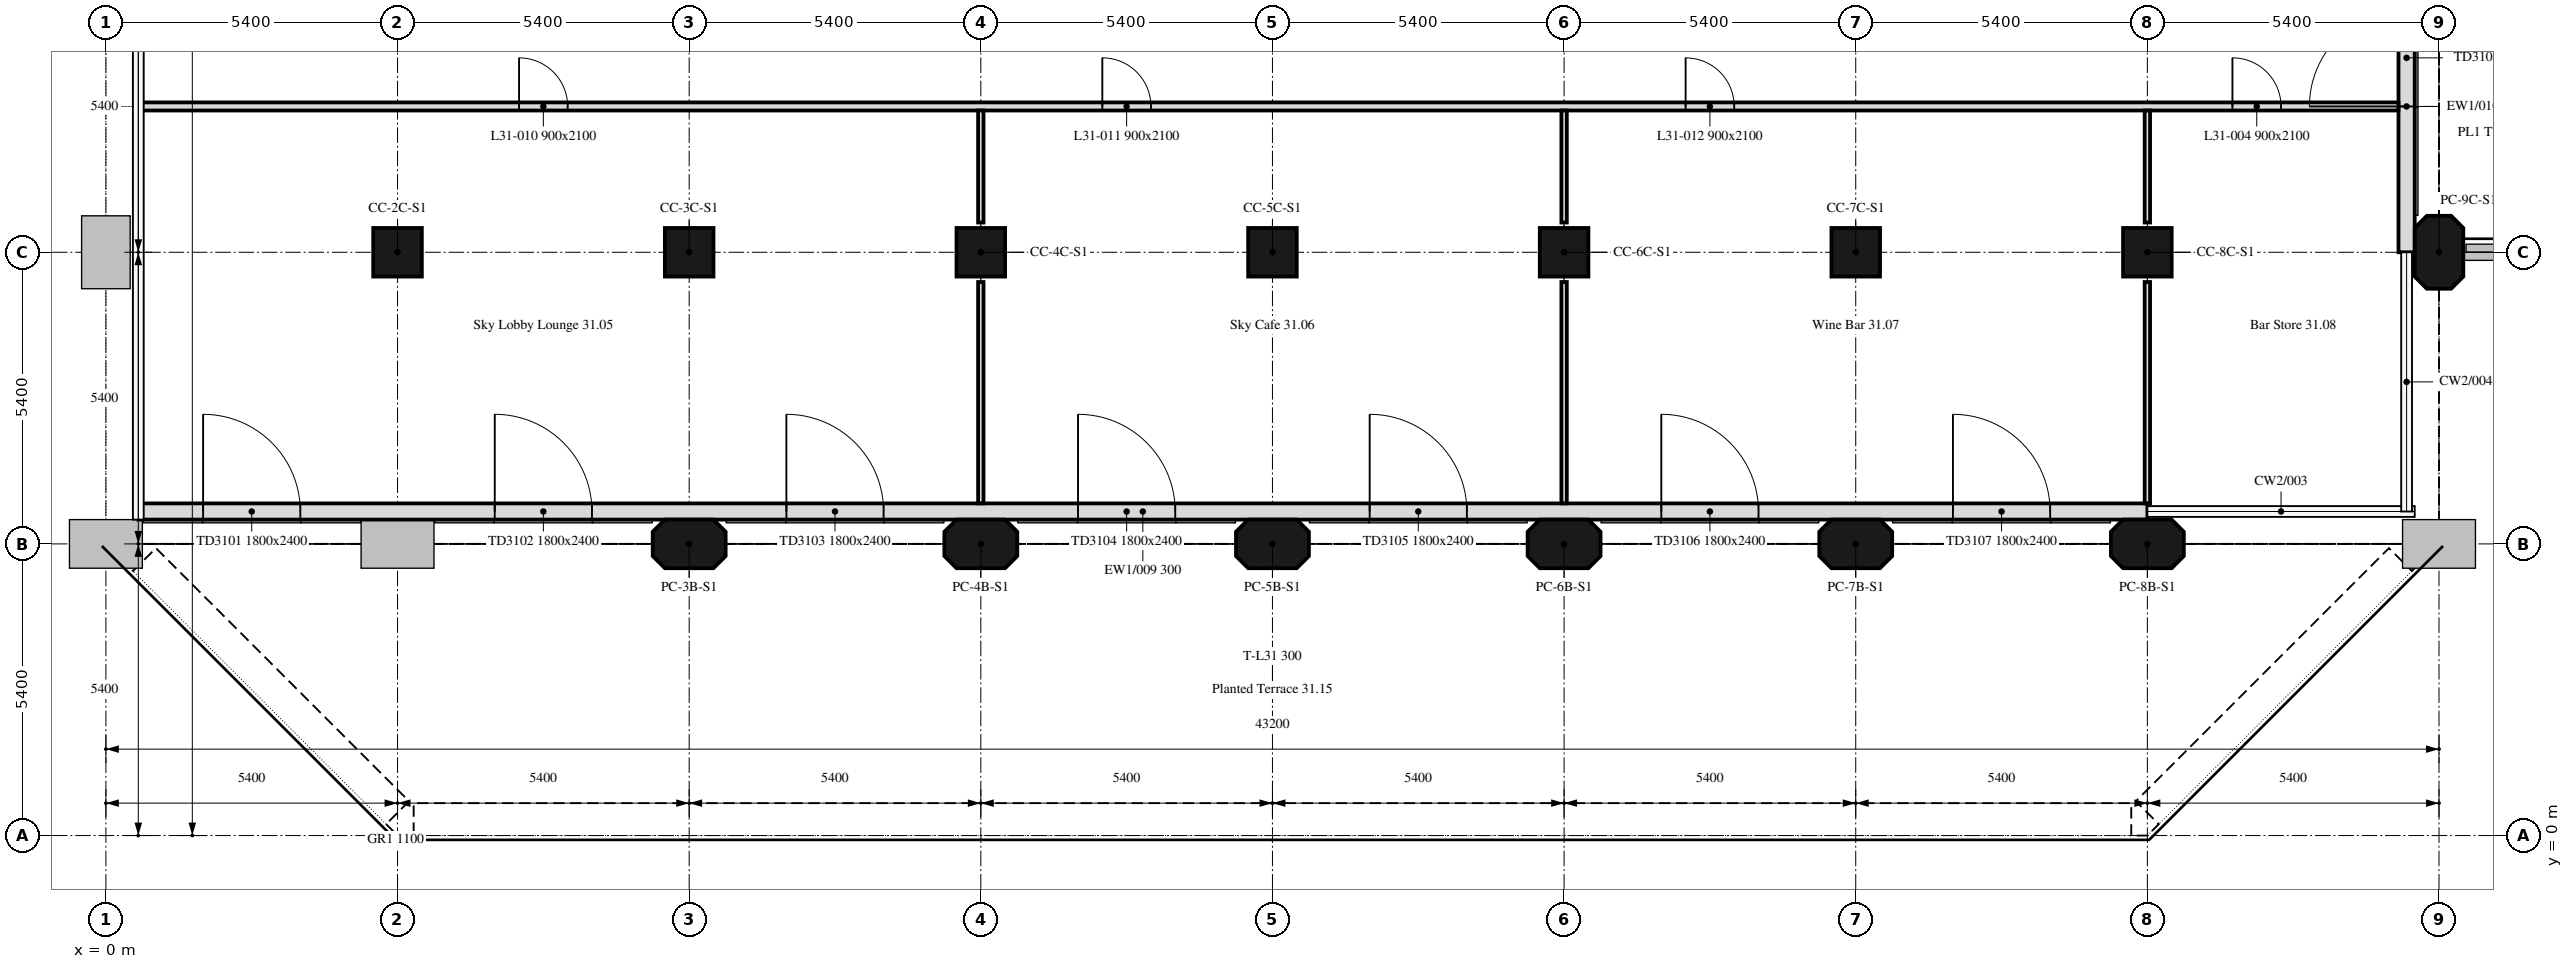
"""IFC4 building model, lengths in metres.
Left out: names, types, materials, properties, quantities, classifications, styles, units other than length and angle.
Written with IfcOpenShell. Run it as: python <this file> out.ifc"""

import sys

from ifc_helpers import new_model, si_unit, direction, frame, frame_2d, origin, origin_2d, place, context, subcontext, project, spatial, polyline, rectangle, outline, extrude, element, fill, save


model = new_model("IFC4")
c1 = context("Model", 3, precision=1e-05, world=origin(), true_north=direction((0.0, 1.0)))
c2 = subcontext(c1, "Body", "Model", "MODEL_VIEW")
j1 = project(units=[si_unit("LENGTHUNIT", "METRE"), si_unit("PLANEANGLEUNIT", "RADIAN")], contexts=[c1])
p1 = place(None, origin())
s1 = spatial("IfcSite", under=j1, at=p1, CompositionType="ELEMENT")
p2 = place(p1, origin())
s2 = spatial("IfcBuilding", under=s1, at=p2, CompositionType="ELEMENT")
p3 = place(p2, frame((0.0, 0.0, 130.6)))
s3 = spatial("IfcBuildingStorey", under=s2, at=p3, CompositionType="ELEMENT", Elevation=130.6)
for number, where, z_axis, x_axis in (
    (1, (10.8, 5.4, 0.0), (0.0, 0.0, 1.0), (1.0, 0.0, 0.0)),
    (2, (16.2, 5.4, 0.0), (0.0, 0.0, 1.0), (1.0, 0.0, 0.0)),
    (3, (21.6, 5.4, 0.0), (0.0, 0.0, 1.0), (1.0, 0.0, 0.0)),
    (4, (27.0, 5.4, 0.0), (0.0, 0.0, 1.0), (1.0, 0.0, 0.0)),
    (5, (32.4, 5.4, 0.0), (0.0, 0.0, 1.0), (1.0, 0.0, 0.0)),
    (6, (37.8, 5.4, 0.0), (0.0, 0.0, 1.0), (1.0, 0.0, 0.0)),
):
    element("IfcColumn", number, at=place(p3, frame(where, z_axis=z_axis, x_axis=x_axis)), inside=s3, PredefinedType="COLUMN", context=c2, shape_type="SweptSolid", body=[
        extrude(outline(polyline([(-0.45, -0.45), (0.45, -0.45), (0.675, -0.225), (0.675, 0.225), (0.45, 0.45), (-0.45, 0.45), (-0.675, 0.225), (-0.675, -0.225), (-0.45, -0.45)])), origin(), (0.0, 0.0, 1.0), 7.5),
    ])
for number, where, z_axis, x_axis in (
    (7, (5.4, 10.8, 0.0), (0.0, 0.0, 1.0), (1.0, 0.0, 0.0)),
    (8, (10.8, 10.8, 0.0), (0.0, 0.0, 1.0), (1.0, 0.0, 0.0)),
    (9, (16.2, 10.8, 0.0), (0.0, 0.0, 1.0), (1.0, 0.0, 0.0)),
    (10, (21.6, 10.8, 0.0), (0.0, 0.0, 1.0), (1.0, 0.0, 0.0)),
    (11, (27.0, 10.8, 0.0), (0.0, 0.0, 1.0), (1.0, 0.0, 0.0)),
    (12, (32.4, 10.8, 0.0), (0.0, 0.0, 1.0), (1.0, 0.0, 0.0)),
    (13, (37.8, 10.8, 0.0), (0.0, 0.0, 1.0), (1.0, 0.0, 0.0)),
):
    element("IfcColumn", number, at=place(p3, frame(where, z_axis=z_axis, x_axis=x_axis)), inside=s3, PredefinedType="COLUMN", context=c2, shape_type="SweptSolid", body=[
        extrude(rectangle(XDim=0.9, YDim=0.9, at=origin_2d()), origin(), (0.0, 0.0, 1.0), 7.5),
    ])
p4 = place(p3, frame((43.2, 10.8, 0.0), z_axis=(0.0, 0.0, 1.0), x_axis=(0.0, 1.0, 0.0)))
e14 = element("IfcColumn", 14, at=p4, inside=s3, PredefinedType="COLUMN", context=c2, shape_type="SweptSolid", body=[
    extrude(outline(polyline([(-0.45, -0.45), (0.45, -0.45), (0.675, -0.225), (0.675, 0.225), (0.45, 0.45), (-0.45, 0.45), (-0.675, 0.225), (-0.675, -0.225), (-0.45, -0.45)])), origin(), (0.0, 0.0, 1.0), 7.5),
])
p5 = place(p3, frame((0.6, 6.0, 0.0), z_axis=(0.0, 0.0, 1.0), x_axis=(1.0, 0.0, 0.0)))
e15 = element("IfcWall", 15, at=p5, inside=s3, PredefinedType="SOLIDWALL", context=c2, shape_type="SweptSolid", body=[
    extrude(rectangle(XDim=37.2, YDim=0.3, at=frame_2d((18.6, 0.0))), origin(), (0.0, 0.0, 1.0), 7.5),
])
p6 = place(p5, frame((1.2, 0.0, 0.0)))
e16 = element("IfcOpeningElement", 16, at=p6, cuts=e15, PredefinedType="OPENING", context=c2, shape_type="SweptSolid", body=[
    extrude(rectangle(XDim=1.8, YDim=2.4, at=frame_2d((0.9, 1.2))), frame((0.0, 0.16, 0.0), z_axis=(0.0, -1.0, 0.0), x_axis=(1.0, 0.0, 0.0)), (0.0, 0.0, 1.0), 0.32),
])
p7 = place(p5, frame((6.6, 0.0, 0.0)))
e17 = element("IfcOpeningElement", 17, at=p7, cuts=e15, PredefinedType="OPENING", context=c2, shape_type="SweptSolid", body=[
    extrude(rectangle(XDim=1.8, YDim=2.4, at=frame_2d((0.9, 1.2))), frame((0.0, 0.16, 0.0), z_axis=(0.0, -1.0, 0.0), x_axis=(1.0, 0.0, 0.0)), (0.0, 0.0, 1.0), 0.32),
])
p8 = place(p5, frame((12.0, 0.0, 0.0)))
e18 = element("IfcOpeningElement", 18, at=p8, cuts=e15, PredefinedType="OPENING", context=c2, shape_type="SweptSolid", body=[
    extrude(rectangle(XDim=1.8, YDim=2.4, at=frame_2d((0.9, 1.2))), frame((0.0, 0.16, 0.0), z_axis=(0.0, -1.0, 0.0), x_axis=(1.0, 0.0, 0.0)), (0.0, 0.0, 1.0), 0.32),
])
p9 = place(p5, frame((17.4, 0.0, 0.0)))
e19 = element("IfcOpeningElement", 19, at=p9, cuts=e15, PredefinedType="OPENING", context=c2, shape_type="SweptSolid", body=[
    extrude(rectangle(XDim=1.8, YDim=2.4, at=frame_2d((0.9, 1.2))), frame((0.0, 0.16, 0.0), z_axis=(0.0, -1.0, 0.0), x_axis=(1.0, 0.0, 0.0)), (0.0, 0.0, 1.0), 0.32),
])
p10 = place(p5, frame((22.8, 0.0, 0.0)))
e20 = element("IfcOpeningElement", 20, at=p10, cuts=e15, PredefinedType="OPENING", context=c2, shape_type="SweptSolid", body=[
    extrude(rectangle(XDim=1.8, YDim=2.4, at=frame_2d((0.9, 1.2))), frame((0.0, 0.16, 0.0), z_axis=(0.0, -1.0, 0.0), x_axis=(1.0, 0.0, 0.0)), (0.0, 0.0, 1.0), 0.32),
])
p11 = place(p5, frame((28.2, 0.0, 0.0)))
e21 = element("IfcOpeningElement", 21, at=p11, cuts=e15, PredefinedType="OPENING", context=c2, shape_type="SweptSolid", body=[
    extrude(rectangle(XDim=1.8, YDim=2.4, at=frame_2d((0.9, 1.2))), frame((0.0, 0.16, 0.0), z_axis=(0.0, -1.0, 0.0), x_axis=(1.0, 0.0, 0.0)), (0.0, 0.0, 1.0), 0.32),
])
p12 = place(p5, frame((33.6, 0.0, 0.0)))
e22 = element("IfcOpeningElement", 22, at=p12, cuts=e15, PredefinedType="OPENING", context=c2, shape_type="SweptSolid", body=[
    extrude(rectangle(XDim=1.8, YDim=2.4, at=frame_2d((0.9, 1.2))), frame((0.0, 0.16, 0.0), z_axis=(0.0, -1.0, 0.0), x_axis=(1.0, 0.0, 0.0)), (0.0, 0.0, 1.0), 0.32),
])
p13 = place(p3, frame((42.6, 10.8, 0.0), z_axis=(0.0, 0.0, 1.0), x_axis=(0.0, 1.0, 0.0)))
e23 = element("IfcWall", 23, at=p13, inside=s3, PredefinedType="SOLIDWALL", context=c2, shape_type="SweptSolid", body=[
    extrude(rectangle(XDim=5.4, YDim=0.3, at=frame_2d((2.7, 0.0))), origin(), (0.0, 0.0, 1.0), 7.5),
])
p14 = place(p13, frame((2.7, 0.0, 0.0)))
e24 = element("IfcOpeningElement", 24, at=p14, cuts=e23, PredefinedType="OPENING", context=c2, shape_type="SweptSolid", body=[
    extrude(rectangle(XDim=1.8, YDim=2.4, at=frame_2d((0.9, 1.2))), frame((0.0, 0.16, 0.0), z_axis=(0.0, -1.0, 0.0), x_axis=(1.0, 0.0, 0.0)), (0.0, 0.0, 1.0), 0.32),
])
p15 = place(p3, frame((0.6, 13.5, 0.0), z_axis=(0.0, 0.0, 1.0), x_axis=(1.0, 0.0, 0.0)))
e25 = element("IfcWall", 25, at=p15, inside=s3, PredefinedType="PARTITIONING", context=c2, shape_type="SweptSolid", body=[
    extrude(rectangle(XDim=41.849, YDim=0.15, at=frame_2d((20.924, 0.0))), origin(), (0.0, 0.0, 1.0), 7.5),
])
p16 = place(p15, frame((38.775, 0.0, 0.0)))
e26 = element("IfcOpeningElement", 26, at=p16, cuts=e25, PredefinedType="OPENING", context=c2, shape_type="SweptSolid", body=[
    extrude(rectangle(XDim=0.9, YDim=2.1, at=frame_2d((0.45, 1.05))), frame((0.0, 0.075, 0.0), z_axis=(0.0, -1.0, 0.0), x_axis=(1.0, 0.0, 0.0)), (0.0, 0.0, 1.0), 0.15),
])
p17 = place(p15, frame((7.05, 0.0, 0.0)))
e27 = element("IfcOpeningElement", 27, at=p17, cuts=e25, PredefinedType="OPENING", context=c2, shape_type="SweptSolid", body=[
    extrude(rectangle(XDim=0.9, YDim=2.1, at=frame_2d((0.45, 1.05))), frame((0.0, 0.075, 0.0), z_axis=(0.0, -1.0, 0.0), x_axis=(1.0, 0.0, 0.0)), (0.0, 0.0, 1.0), 0.15),
])
p18 = place(p15, frame((17.85, 0.0, 0.0)))
e28 = element("IfcOpeningElement", 28, at=p18, cuts=e25, PredefinedType="OPENING", context=c2, shape_type="SweptSolid", body=[
    extrude(rectangle(XDim=0.9, YDim=2.1, at=frame_2d((0.45, 1.05))), frame((0.0, 0.075, 0.0), z_axis=(0.0, -1.0, 0.0), x_axis=(1.0, 0.0, 0.0)), (0.0, 0.0, 1.0), 0.15),
])
p19 = place(p15, frame((28.65, 0.0, 0.0)))
e29 = element("IfcOpeningElement", 29, at=p19, cuts=e25, PredefinedType="OPENING", context=c2, shape_type="SweptSolid", body=[
    extrude(rectangle(XDim=0.9, YDim=2.1, at=frame_2d((0.45, 1.05))), frame((0.0, 0.075, 0.0), z_axis=(0.0, -1.0, 0.0), x_axis=(1.0, 0.0, 0.0)), (0.0, 0.0, 1.0), 0.15),
])
p20 = place(p3, frame((16.2, 6.151, 0.0), z_axis=(0.0, 0.0, 1.0), x_axis=(0.0, 1.0, 0.0)))
e30 = element("IfcWall", 30, at=p20, inside=s3, PredefinedType="PARTITIONING", context=c2, shape_type="SweptSolid", body=[
    extrude(rectangle(XDim=4.098, YDim=0.1, at=frame_2d((2.049, 0.0))), origin(), (0.0, 0.0, 1.0), 7.5),
])
p21 = place(p3, frame((16.2, 11.351, 0.0), z_axis=(0.0, 0.0, 1.0), x_axis=(0.0, 1.0, 0.0)))
e31 = element("IfcWall", 31, at=p21, inside=s3, PredefinedType="PARTITIONING", context=c2, shape_type="SweptSolid", body=[
    extrude(rectangle(XDim=2.074, YDim=0.1, at=frame_2d((1.037, 0.0))), origin(), (0.0, 0.0, 1.0), 7.5),
])
p22 = place(p3, frame((27.0, 6.151, 0.0), z_axis=(0.0, 0.0, 1.0), x_axis=(0.0, 1.0, 0.0)))
e32 = element("IfcWall", 32, at=p22, inside=s3, PredefinedType="PARTITIONING", context=c2, shape_type="SweptSolid", body=[
    extrude(rectangle(XDim=4.098, YDim=0.1, at=frame_2d((2.049, 0.0))), origin(), (0.0, 0.0, 1.0), 7.5),
])
p23 = place(p3, frame((27.0, 11.351, 0.0), z_axis=(0.0, 0.0, 1.0), x_axis=(0.0, 1.0, 0.0)))
e33 = element("IfcWall", 33, at=p23, inside=s3, PredefinedType="PARTITIONING", context=c2, shape_type="SweptSolid", body=[
    extrude(rectangle(XDim=2.074, YDim=0.1, at=frame_2d((1.037, 0.0))), origin(), (0.0, 0.0, 1.0), 7.5),
])
p24 = place(p3, frame((37.8, 6.151, 0.0), z_axis=(0.0, 0.0, 1.0), x_axis=(0.0, 1.0, 0.0)))
e34 = element("IfcWall", 34, at=p24, inside=s3, PredefinedType="PARTITIONING", context=c2, shape_type="SweptSolid", body=[
    extrude(rectangle(XDim=4.098, YDim=0.1, at=frame_2d((2.049, 0.0))), origin(), (0.0, 0.0, 1.0), 7.5),
])
p25 = place(p3, frame((37.8, 11.351, 0.0), z_axis=(0.0, 0.0, 1.0), x_axis=(0.0, 1.0, 0.0)))
e35 = element("IfcWall", 35, at=p25, inside=s3, PredefinedType="PARTITIONING", context=c2, shape_type="SweptSolid", body=[
    extrude(rectangle(XDim=2.074, YDim=0.1, at=frame_2d((1.037, 0.0))), origin(), (0.0, 0.0, 1.0), 7.5),
])
p26 = place(p6, origin())
e36 = element("IfcDoor", 36, at=p26, inside=s3, OperationType="DOUBLE_DOOR_DOUBLE_SWING", PredefinedType="DOOR", context=c2, shape_type="SweptSolid", body=[
    extrude(rectangle(XDim=1.8, YDim=2.4, at=frame_2d((0.9, 1.2))), frame((0.0, 0.025, 0.0), z_axis=(0.0, -1.0, 0.0), x_axis=(1.0, 0.0, 0.0)), (0.0, 0.0, 1.0), 0.05),
])
fill(e16, e36)
p27 = place(p7, origin())
e37 = element("IfcDoor", 37, at=p27, inside=s3, OperationType="DOUBLE_DOOR_DOUBLE_SWING", PredefinedType="DOOR", context=c2, shape_type="SweptSolid", body=[
    extrude(rectangle(XDim=1.8, YDim=2.4, at=frame_2d((0.9, 1.2))), frame((0.0, 0.025, 0.0), z_axis=(0.0, -1.0, 0.0), x_axis=(1.0, 0.0, 0.0)), (0.0, 0.0, 1.0), 0.05),
])
fill(e17, e37)
p28 = place(p8, origin())
e38 = element("IfcDoor", 38, at=p28, inside=s3, OperationType="DOUBLE_DOOR_DOUBLE_SWING", PredefinedType="DOOR", context=c2, shape_type="SweptSolid", body=[
    extrude(rectangle(XDim=1.8, YDim=2.4, at=frame_2d((0.9, 1.2))), frame((0.0, 0.025, 0.0), z_axis=(0.0, -1.0, 0.0), x_axis=(1.0, 0.0, 0.0)), (0.0, 0.0, 1.0), 0.05),
])
fill(e18, e38)
p29 = place(p9, origin())
e39 = element("IfcDoor", 39, at=p29, inside=s3, OperationType="DOUBLE_DOOR_DOUBLE_SWING", PredefinedType="DOOR", context=c2, shape_type="SweptSolid", body=[
    extrude(rectangle(XDim=1.8, YDim=2.4, at=frame_2d((0.9, 1.2))), frame((0.0, 0.025, 0.0), z_axis=(0.0, -1.0, 0.0), x_axis=(1.0, 0.0, 0.0)), (0.0, 0.0, 1.0), 0.05),
])
fill(e19, e39)
p30 = place(p10, origin())
e40 = element("IfcDoor", 40, at=p30, inside=s3, OperationType="DOUBLE_DOOR_DOUBLE_SWING", PredefinedType="DOOR", context=c2, shape_type="SweptSolid", body=[
    extrude(rectangle(XDim=1.8, YDim=2.4, at=frame_2d((0.9, 1.2))), frame((0.0, 0.025, 0.0), z_axis=(0.0, -1.0, 0.0), x_axis=(1.0, 0.0, 0.0)), (0.0, 0.0, 1.0), 0.05),
])
fill(e20, e40)
p31 = place(p11, origin())
e41 = element("IfcDoor", 41, at=p31, inside=s3, OperationType="DOUBLE_DOOR_DOUBLE_SWING", PredefinedType="DOOR", context=c2, shape_type="SweptSolid", body=[
    extrude(rectangle(XDim=1.8, YDim=2.4, at=frame_2d((0.9, 1.2))), frame((0.0, 0.025, 0.0), z_axis=(0.0, -1.0, 0.0), x_axis=(1.0, 0.0, 0.0)), (0.0, 0.0, 1.0), 0.05),
])
fill(e21, e41)
p32 = place(p12, origin())
e42 = element("IfcDoor", 42, at=p32, inside=s3, OperationType="DOUBLE_DOOR_DOUBLE_SWING", PredefinedType="DOOR", context=c2, shape_type="SweptSolid", body=[
    extrude(rectangle(XDim=1.8, YDim=2.4, at=frame_2d((0.9, 1.2))), frame((0.0, 0.025, 0.0), z_axis=(0.0, -1.0, 0.0), x_axis=(1.0, 0.0, 0.0)), (0.0, 0.0, 1.0), 0.05),
])
fill(e22, e42)
p33 = place(p14, origin())
e43 = element("IfcDoor", 43, at=p33, inside=s3, OperationType="DOUBLE_DOOR_DOUBLE_SWING", PredefinedType="DOOR", context=c2, shape_type="SweptSolid", body=[
    extrude(rectangle(XDim=1.8, YDim=2.4, at=frame_2d((0.9, 1.2))), frame((0.0, 0.025, 0.0), z_axis=(0.0, -1.0, 0.0), x_axis=(1.0, 0.0, 0.0)), (0.0, 0.0, 1.0), 0.05),
])
fill(e24, e43)
p34 = place(p16, origin())
e44 = element("IfcDoor", 44, at=p34, inside=s3, OperationType="SINGLE_SWING_LEFT", PredefinedType="DOOR", context=c2, shape_type="SweptSolid", body=[
    extrude(rectangle(XDim=0.9, YDim=2.1, at=frame_2d((0.45, 1.05))), frame((0.0, 0.025, 0.0), z_axis=(0.0, -1.0, 0.0), x_axis=(1.0, 0.0, 0.0)), (0.0, 0.0, 1.0), 0.05),
])
fill(e26, e44)
p35 = place(p17, origin())
e45 = element("IfcDoor", 45, at=p35, inside=s3, OperationType="SINGLE_SWING_RIGHT", PredefinedType="DOOR", context=c2, shape_type="SweptSolid", body=[
    extrude(rectangle(XDim=0.9, YDim=2.1, at=frame_2d((0.45, 1.05))), frame((0.0, 0.025, 0.0), z_axis=(0.0, -1.0, 0.0), x_axis=(1.0, 0.0, 0.0)), (0.0, 0.0, 1.0), 0.05),
])
fill(e27, e45)
p36 = place(p18, origin())
e46 = element("IfcDoor", 46, at=p36, inside=s3, OperationType="SINGLE_SWING_RIGHT", PredefinedType="DOOR", context=c2, shape_type="SweptSolid", body=[
    extrude(rectangle(XDim=0.9, YDim=2.1, at=frame_2d((0.45, 1.05))), frame((0.0, 0.025, 0.0), z_axis=(0.0, -1.0, 0.0), x_axis=(1.0, 0.0, 0.0)), (0.0, 0.0, 1.0), 0.05),
])
fill(e28, e46)
p37 = place(p19, origin())
e47 = element("IfcDoor", 47, at=p37, inside=s3, OperationType="SINGLE_SWING_RIGHT", PredefinedType="DOOR", context=c2, shape_type="SweptSolid", body=[
    extrude(rectangle(XDim=0.9, YDim=2.1, at=frame_2d((0.45, 1.05))), frame((0.0, 0.025, 0.0), z_axis=(0.0, -1.0, 0.0), x_axis=(1.0, 0.0, 0.0)), (0.0, 0.0, 1.0), 0.05),
])
fill(e29, e47)
save(model, sys.argv[1])
